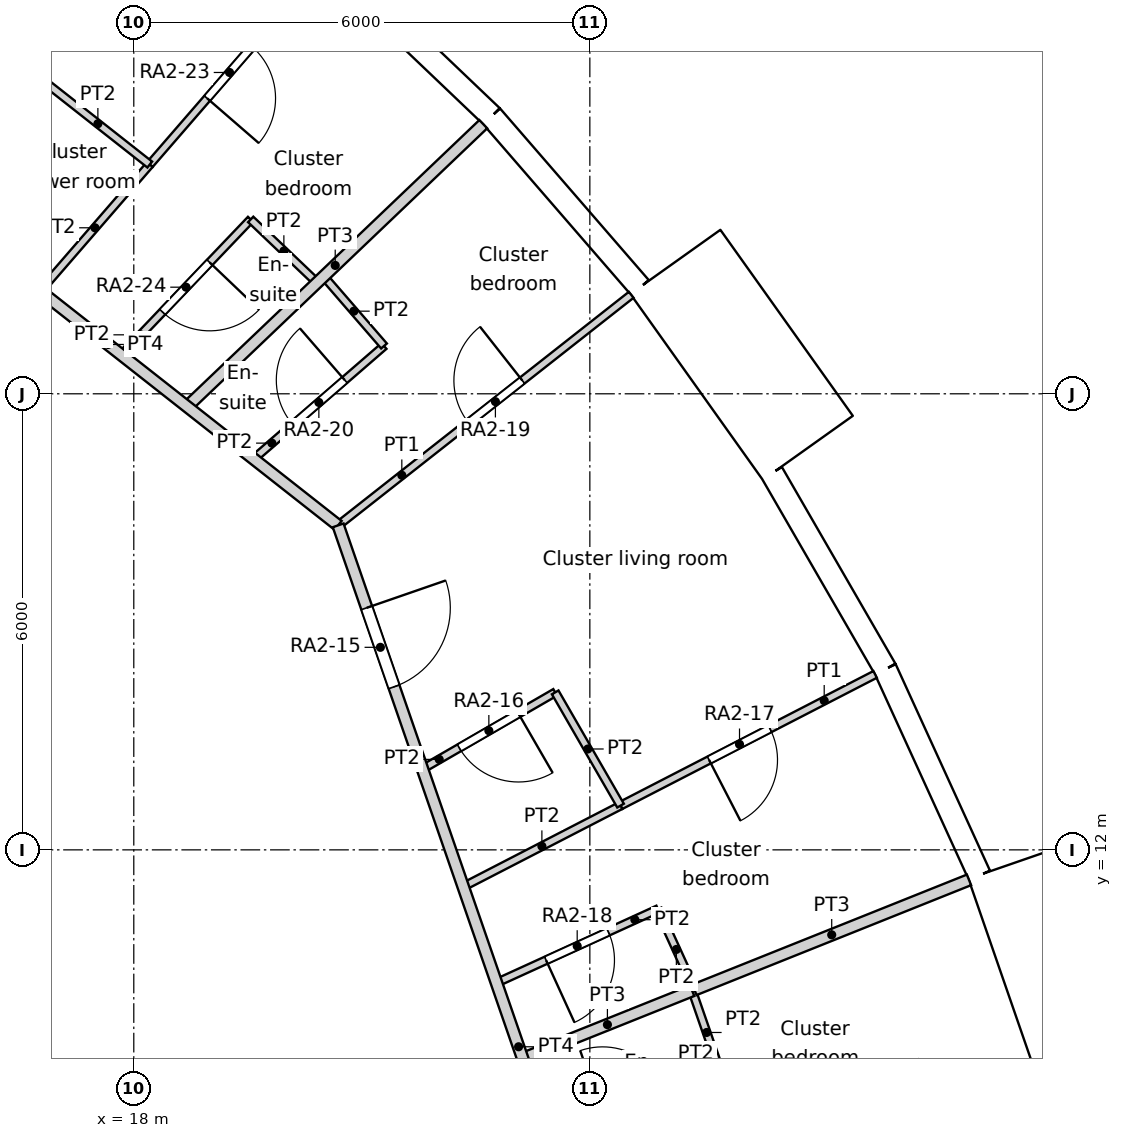
"""IFC4 building model, lengths in metres.
Left out: names, types, materials, properties, quantities, classifications, styles, units other than length and angle.
Written with IfcOpenShell. Run it as: python <this file> out.ifc"""

import sys

from ifc_helpers import new_model, si_unit, direction, frame, frame_2d, origin, origin_2d, place, context, subcontext, project, spatial, rectangle, circle, extrude, element, fill, save


model = new_model("IFC4")
c1 = context("Model", 3, precision=1e-05, world=origin(), true_north=direction((0.0, 1.0)))
c2 = subcontext(c1, "Body", "Model", "MODEL_VIEW")
j1 = project(units=[si_unit("LENGTHUNIT", "METRE"), si_unit("PLANEANGLEUNIT", "RADIAN")], contexts=[c1])
p1 = place(None, origin())
s1 = spatial("IfcSite", under=j1, at=p1, CompositionType="ELEMENT")
p2 = place(p1, origin())
s2 = spatial("IfcBuilding", under=s1, at=p2, CompositionType="ELEMENT")
p3 = place(p2, frame((0.0, 0.0, 39.0)))
s3 = spatial("IfcBuildingStorey", under=s2, at=p3, CompositionType="ELEMENT", Elevation=39.0)
for number, where, z_axis, x_axis in (
    (1, (28.106, 11.252, 0.0), (0.0, 0.0, 1.0), (1.0, 0.0, 0.0)),
    (2, (25.469, 16.368, 0.0), (0.0, 0.0, 1.0), (1.0, 0.0, 0.0)),
    (3, (21.911, 20.892, 0.0), (0.0, 0.0, 1.0), (1.0, 0.0, 0.0)),
):
    element("IfcColumn", number, at=place(p3, frame(where, z_axis=z_axis, x_axis=x_axis)), inside=s3, PredefinedType="COLUMN", context=c2, shape_type="SweptSolid", body=[
        extrude(circle(Radius=0.7, at=origin_2d()), origin(), (0.0, 0.0, 1.0), 3.6),
    ])
for number, where, z_axis, x_axis in (
    (4, (21.937, 11.017, 0.0), (0.0, 0.0, 1.0), (1.0, 0.0, 0.0)),
    (5, (18.805, 15.779, 0.0), (0.0, 0.0, 1.0), (1.0, 0.0, 0.0)),
):
    element("IfcColumn", number, at=place(p3, frame(where, z_axis=z_axis, x_axis=x_axis)), inside=s3, PredefinedType="COLUMN", context=c2, shape_type="SweptSolid", body=[
        extrude(circle(Radius=0.75, at=origin_2d()), origin(), (0.0, 0.0, 1.0), 3.6),
    ])
p4 = place(p3, frame((30.649, 9.021, -0.45), z_axis=(0.0, 0.0, 1.0), x_axis=(-0.327071431777, 0.944999618262, 0.0)))
e6 = element("IfcWall", 6, at=p4, inside=s3, PredefinedType="ELEMENTEDWALL", context=c2, shape_type="SweptSolid", body=[
    extrude(rectangle(XDim=3.0, YDim=1.45, at=frame_2d((1.5, 0.0))), origin(), (0.0, 0.0, 1.0), 3.6),
])
p5 = place(p4, frame((1.5, 0.0, 2.0)))
e7 = element("IfcOpeningElement", 7, at=p5, cuts=e6, PredefinedType="OPENING", context=c2, shape_type="SweptSolid", body=[
    extrude(circle(Radius=0.9, at=origin_2d()), frame((0.0, 0.735, 0.0), z_axis=(0.0, -1.0, 0.0), x_axis=(1.0, 0.0, 0.0)), (0.0, 0.0, 1.0), 1.47),
])
p6 = place(p3, frame((29.125, 11.666, 0.0), z_axis=(0.0, 0.0, 1.0), x_axis=(-0.415407317162, 0.909635509888, 0.0)))
e8 = element("IfcWall", 8, at=p6, inside=s3, PredefinedType="SOLIDWALL", context=c2, shape_type="SweptSolid", body=[
    extrude(rectangle(XDim=2.98, YDim=0.3, at=frame_2d((1.49, 0.0))), origin(), (0.0, 0.0, 1.0), 3.15),
])
p7 = place(p6, frame((1.49, 0.0, 1.55)))
e9 = element("IfcOpeningElement", 9, at=p7, cuts=e8, PredefinedType="OPENING", context=c2, shape_type="SweptSolid", body=[
    extrude(circle(Radius=0.9, at=origin_2d()), frame((0.0, 0.16, 0.0), z_axis=(0.0, -1.0, 0.0), x_axis=(1.0, 0.0, 0.0)), (0.0, 0.0, 1.0), 0.32),
])
p8 = place(p3, frame((27.887, 14.377, 0.0), z_axis=(0.0, 0.0, 1.0), x_axis=(-0.499999078476, 0.866025935826, 0.0)))
e10 = element("IfcWall", 10, at=p8, inside=s3, PredefinedType="SOLIDWALL", context=c2, shape_type="SweptSolid", body=[
    extrude(rectangle(XDim=2.979, YDim=0.3, at=frame_2d((1.49, 0.0))), origin(), (0.0, 0.0, 1.0), 3.15),
])
p9 = place(p8, frame((1.49, 0.0, 1.55)))
e11 = element("IfcOpeningElement", 11, at=p9, cuts=e10, PredefinedType="OPENING", context=c2, shape_type="SweptSolid", body=[
    extrude(circle(Radius=0.9, at=origin_2d()), frame((0.0, 0.16, 0.0), z_axis=(0.0, -1.0, 0.0), x_axis=(1.0, 0.0, 0.0)), (0.0, 0.0, 1.0), 0.32),
])
p10 = place(p3, frame((26.866, 17.29, -0.45), z_axis=(0.0, 0.0, 1.0), x_axis=(-0.580090570606, 0.814551981088, 0.0)))
e12 = element("IfcWall", 12, at=p10, inside=s3, PredefinedType="ELEMENTEDWALL", context=c2, shape_type="SweptSolid", body=[
    extrude(rectangle(XDim=3.0, YDim=1.45, at=frame_2d((1.5, 0.0))), origin(), (0.0, 0.0, 1.0), 3.6),
])
p11 = place(p10, frame((1.5, 0.0, 2.0)))
e13 = element("IfcOpeningElement", 13, at=p11, cuts=e12, PredefinedType="OPENING", context=c2, shape_type="SweptSolid", body=[
    extrude(circle(Radius=0.9, at=origin_2d()), frame((0.0, 0.735, 0.0), z_axis=(0.0, -1.0, 0.0), x_axis=(1.0, 0.0, 0.0)), (0.0, 0.0, 1.0), 1.47),
])
p12 = place(p3, frame((24.658, 19.399, 0.0), z_axis=(0.0, 0.0, 1.0), x_axis=(-0.654830712471, 0.755775587066, 0.0)))
e14 = element("IfcWall", 14, at=p12, inside=s3, PredefinedType="SOLIDWALL", context=c2, shape_type="SweptSolid", body=[
    extrude(rectangle(XDim=2.98, YDim=0.3, at=frame_2d((1.49, 0.0))), origin(), (0.0, 0.0, 1.0), 3.15),
])
p13 = place(p12, frame((1.49, 0.0, 1.55)))
e15 = element("IfcOpeningElement", 15, at=p13, cuts=e14, PredefinedType="OPENING", context=c2, shape_type="SweptSolid", body=[
    extrude(circle(Radius=0.9, at=origin_2d()), frame((0.0, 0.16, 0.0), z_axis=(0.0, -1.0, 0.0), x_axis=(1.0, 0.0, 0.0)), (0.0, 0.0, 1.0), 0.32),
])
p14 = place(p3, frame((22.707, 21.651, 0.0), z_axis=(0.0, 0.0, 1.0), x_axis=(-0.723744206617, 0.690068346896, 0.0)))
e16 = element("IfcWall", 16, at=p14, inside=s3, PredefinedType="SOLIDWALL", context=c2, shape_type="SweptSolid", body=[
    extrude(rectangle(XDim=2.98, YDim=0.3, at=frame_2d((1.49, 0.0))), origin(), (0.0, 0.0, 1.0), 3.15),
])
p15 = place(p14, frame((1.49, 0.0, 1.55)))
e17 = element("IfcOpeningElement", 17, at=p15, cuts=e16, PredefinedType="OPENING", context=c2, shape_type="SweptSolid", body=[
    extrude(circle(Radius=0.9, at=origin_2d()), frame((0.0, 0.16, 0.0), z_axis=(0.0, -1.0, 0.0), x_axis=(1.0, 0.0, 0.0)), (0.0, 0.0, 1.0), 0.32),
])
p16 = place(p3, frame((20.689, 16.269, 0.0), z_axis=(0.0, 0.0, 1.0), x_axis=(0.327000485361, -0.945024170365, 0.0)))
e18 = element("IfcWall", 18, at=p16, inside=s3, PredefinedType="PARTITIONING", context=c2, shape_type="SweptSolid", body=[
    extrude(rectangle(XDim=17.216, YDim=0.15, at=frame_2d((8.608, 0.0))), origin(), (0.0, 0.0, 1.0), 3.15),
])
p17 = place(p16, frame((12.47, 0.0, 0.0)))
e19 = element("IfcOpeningElement", 19, at=p17, cuts=e18, PredefinedType="OPENING", context=c2, shape_type="SweptSolid", body=[
    extrude(rectangle(XDim=1.1, YDim=2.1, at=frame_2d((0.55, 1.05))), frame((0.0, 0.075, 0.0), z_axis=(0.0, -1.0, 0.0), x_axis=(1.0, 0.0, 0.0)), (0.0, 0.0, 1.0), 0.15),
])
p18 = place(p16, frame((1.148, 0.0, 0.0)))
e20 = element("IfcOpeningElement", 20, at=p18, cuts=e18, PredefinedType="OPENING", context=c2, shape_type="SweptSolid", body=[
    extrude(rectangle(XDim=1.1, YDim=2.1, at=frame_2d((0.55, 1.05))), frame((0.0, 0.075, 0.0), z_axis=(0.0, -1.0, 0.0), x_axis=(1.0, 0.0, 0.0)), (0.0, 0.0, 1.0), 0.15),
])
p19 = place(p3, frame((10.933, 23.94, 0.0), z_axis=(0.0, 0.0, 1.0), x_axis=(0.786069782367, -0.618137765591, 0.0)))
e21 = element("IfcWall", 21, at=p19, inside=s3, PredefinedType="PARTITIONING", context=c2, shape_type="SweptSolid", body=[
    extrude(rectangle(XDim=12.41, YDim=0.15, at=frame_2d((6.205, 0.0))), origin(), (0.0, 0.0, 1.0), 3.15),
])
p20 = place(p19, frame((3.559, 0.0, 0.0)))
e22 = element("IfcOpeningElement", 22, at=p20, cuts=e21, PredefinedType="OPENING", context=c2, shape_type="SweptSolid", body=[
    extrude(rectangle(XDim=1.1, YDim=2.1, at=frame_2d((0.55, 1.05))), frame((0.0, 0.075, 0.0), z_axis=(0.0, -1.0, 0.0), x_axis=(1.0, 0.0, 0.0)), (0.0, 0.0, 1.0), 0.15),
])
p21 = place(p3, frame((25.346, 10.147, 0.0), z_axis=(0.0, 0.0, 1.0), x_axis=(0.327665639351, -0.944793749338, 0.0)))
e23 = element("IfcWall", 23, at=p21, inside=s3, PredefinedType="PARTITIONING", context=c2, shape_type="SweptSolid", body=[
    extrude(rectangle(XDim=1.163, YDim=0.1, at=frame_2d((0.582, 0.0))), origin(), (0.0, 0.0, 1.0), 3.15),
])
p22 = place(p3, frame((25.376, 10.159, 0.0), z_axis=(0.0, 0.0, 1.0), x_axis=(0.928368463908, 0.371661129553, 0.0)))
e24 = element("IfcWall", 24, at=p22, inside=s3, PredefinedType="PARTITIONING", context=c2, shape_type="SweptSolid", body=[
    extrude(rectangle(XDim=3.891, YDim=0.15, at=frame_2d((1.945, 0.0))), origin(), (0.0, 0.0, 1.0), 3.15),
])
p23 = place(p3, frame((23.116, 9.254, 0.0), z_axis=(0.0, 0.0, 1.0), x_axis=(0.928322407966, 0.371776151559, 0.0)))
e25 = element("IfcWall", 25, at=p23, inside=s3, PredefinedType="PARTITIONING", context=c2, shape_type="SweptSolid", body=[
    extrude(rectangle(XDim=2.402, YDim=0.15, at=frame_2d((1.201, 0.0))), origin(), (0.0, 0.0, 1.0), 3.15),
])
p24 = place(p3, frame((23.544, 14.072, 0.0), z_axis=(0.0, 0.0, 1.0), x_axis=(0.499939472521, -0.866060346521, 0.0)))
e26 = element("IfcWall", 26, at=p24, inside=s3, PredefinedType="PARTITIONING", context=c2, shape_type="SweptSolid", body=[
    extrude(rectangle(XDim=1.72, YDim=0.1, at=frame_2d((0.86, 0.0))), origin(), (0.0, 0.0, 1.0), 3.15),
])
p25 = place(p3, frame((21.798, 13.063, 0.0), z_axis=(0.0, 0.0, 1.0), x_axis=(0.865796302872, 0.500396604638, 0.0)))
e27 = element("IfcWall", 27, at=p25, inside=s3, PredefinedType="PARTITIONING", context=c2, shape_type="SweptSolid", body=[
    extrude(rectangle(XDim=2.016, YDim=0.1, at=frame_2d((1.008, 0.0))), origin(), (0.0, 0.0, 1.0), 3.15),
])
p26 = place(p25, frame((0.559, 0.0, 0.0)))
e28 = element("IfcOpeningElement", 28, at=p26, cuts=e27, PredefinedType="OPENING", context=c2, shape_type="SweptSolid", body=[
    extrude(rectangle(XDim=0.9, YDim=2.0, at=frame_2d((0.45, 1.0))), frame((0.0, 0.05, 0.0), z_axis=(0.0, -1.0, 0.0), x_axis=(1.0, 0.0, 0.0)), (0.0, 0.0, 1.0), 0.1),
])
p27 = place(p3, frame((24.404, 12.582, 0.0), z_axis=(0.0, 0.0, 1.0), x_axis=(0.888877805079, 0.458144352403, 0.0)))
e29 = element("IfcWall", 29, at=p27, inside=s3, PredefinedType="PARTITIONING", context=c2, shape_type="SweptSolid", body=[
    extrude(rectangle(XDim=3.768, YDim=0.1, at=frame_2d((1.884, 0.0))), origin(), (0.0, 0.0, 1.0), 3.15),
])
p28 = place(p27, frame((1.311, 0.0, 0.0)))
e30 = element("IfcOpeningElement", 30, at=p28, cuts=e29, PredefinedType="OPENING", context=c2, shape_type="SweptSolid", body=[
    extrude(rectangle(XDim=0.9, YDim=2.1, at=frame_2d((0.45, 1.05))), frame((0.0, 0.05, 0.0), z_axis=(0.0, -1.0, 0.0), x_axis=(1.0, 0.0, 0.0)), (0.0, 0.0, 1.0), 0.1),
])
p29 = place(p3, frame((20.688, 16.269, 0.0), z_axis=(0.0, 0.0, 1.0), x_axis=(0.78599357822, 0.618234660139, 0.0)))
e31 = element("IfcWall", 31, at=p29, inside=s3, PredefinedType="PARTITIONING", context=c2, shape_type="SweptSolid", body=[
    extrude(rectangle(XDim=4.906, YDim=0.1, at=frame_2d((2.453, 0.0))), origin(), (0.0, 0.0, 1.0), 3.15),
])
p30 = place(p29, frame((2.183, 0.0, 0.0)))
e32 = element("IfcOpeningElement", 32, at=p30, cuts=e31, PredefinedType="OPENING", context=c2, shape_type="SweptSolid", body=[
    extrude(rectangle(XDim=0.9, YDim=2.1, at=frame_2d((0.45, 1.05))), frame((0.0, 0.05, 0.0), z_axis=(0.0, -1.0, 0.0), x_axis=(1.0, 0.0, 0.0)), (0.0, 0.0, 1.0), 0.1),
])
p31 = place(p3, frame((22.334, 11.514, 0.0), z_axis=(0.0, 0.0, 1.0), x_axis=(0.888674390259, 0.45853879672, 0.0)))
e33 = element("IfcWall", 33, at=p31, inside=s3, PredefinedType="PARTITIONING", context=c2, shape_type="SweptSolid", body=[
    extrude(rectangle(XDim=2.329, YDim=0.1, at=frame_2d((1.165, 0.0))), origin(), (0.0, 0.0, 1.0), 3.15),
])
p32 = place(p3, frame((24.896, 11.22, 0.0), z_axis=(0.0, 0.0, 1.0), x_axis=(0.415254658207, -0.909705209855, 0.0)))
e34 = element("IfcWall", 34, at=p32, inside=s3, PredefinedType="PARTITIONING", context=c2, shape_type="SweptSolid", body=[
    extrude(rectangle(XDim=1.165, YDim=0.1, at=frame_2d((0.583, 0.0))), origin(), (0.0, 0.0, 1.0), 3.15),
])
p33 = place(p3, frame((22.771, 10.25, 0.0), z_axis=(0.0, 0.0, 1.0), x_axis=(0.909710320081, 0.415243462969, 0.0)))
e35 = element("IfcWall", 35, at=p33, inside=s3, PredefinedType="PARTITIONING", context=c2, shape_type="SweptSolid", body=[
    extrude(rectangle(XDim=2.336, YDim=0.1, at=frame_2d((1.168, 0.0))), origin(), (0.0, 0.0, 1.0), 3.15),
])
p34 = place(p33, frame((0.718, 0.0, 0.0)))
e36 = element("IfcOpeningElement", 36, at=p34, cuts=e35, PredefinedType="OPENING", context=c2, shape_type="SweptSolid", body=[
    extrude(rectangle(XDim=0.9, YDim=2.04, at=frame_2d((0.45, 1.02))), frame((0.0, 0.05, 0.0), z_axis=(0.0, -1.0, 0.0), x_axis=(1.0, 0.0, 0.0)), (0.0, 0.0, 1.0), 0.1),
])
p35 = place(p3, frame((19.577, 17.143, 0.0), z_axis=(0.0, 0.0, 1.0), x_axis=(0.755813315469, 0.654787165543, 0.0)))
e37 = element("IfcWall", 37, at=p35, inside=s3, PredefinedType="PARTITIONING", context=c2, shape_type="SweptSolid", body=[
    extrude(rectangle(XDim=2.269, YDim=0.1, at=frame_2d((1.135, 0.0))), origin(), (0.0, 0.0, 1.0), 3.15),
])
p36 = place(p35, frame((0.685, 0.0, 0.0)))
e38 = element("IfcOpeningElement", 38, at=p36, cuts=e37, PredefinedType="OPENING", context=c2, shape_type="SweptSolid", body=[
    extrude(rectangle(XDim=0.9, YDim=2.04, at=frame_2d((0.45, 1.02))), frame((0.0, 0.05, 0.0), z_axis=(0.0, -1.0, 0.0), x_axis=(1.0, 0.0, 0.0)), (0.0, 0.0, 1.0), 0.1),
])
p37 = place(p3, frame((20.499, 19.545, 0.0), z_axis=(0.0, 0.0, 1.0), x_axis=(0.654500819756, -0.756061291787, 0.0)))
e39 = element("IfcWall", 39, at=p37, inside=s3, PredefinedType="PARTITIONING", context=c2, shape_type="SweptSolid", body=[
    extrude(rectangle(XDim=1.212, YDim=0.1, at=frame_2d((0.606, 0.0))), origin(), (0.0, 0.0, 1.0), 3.15),
])
p38 = place(p3, frame((18.702, 17.831, 0.0), z_axis=(0.0, 0.0, 1.0), x_axis=(0.723619032975, 0.690199605271, 0.0)))
e40 = element("IfcWall", 40, at=p38, inside=s3, PredefinedType="PARTITIONING", context=c2, shape_type="SweptSolid", body=[
    extrude(rectangle(XDim=5.384, YDim=0.15, at=frame_2d((2.692, 0.0))), origin(), (0.0, 0.0, 1.0), 3.15),
])
p39 = place(p3, frame((16.845, 22.09, 0.0), z_axis=(0.0, 0.0, 1.0), x_axis=(0.785903559082, -0.618349088964, 0.0)))
e41 = element("IfcWall", 41, at=p39, inside=s3, PredefinedType="PARTITIONING", context=c2, shape_type="SweptSolid", body=[
    extrude(rectangle(XDim=1.737, YDim=0.1, at=frame_2d((0.868, 0.0))), origin(), (0.0, 0.0, 1.0), 3.15),
])
p40 = place(p3, frame((18.21, 21.016, 0.0), z_axis=(0.0, 0.0, 1.0), x_axis=(0.655012143666, 0.755618350525, 0.0)))
e42 = element("IfcWall", 42, at=p40, inside=s3, PredefinedType="PARTITIONING", context=c2, shape_type="SweptSolid", body=[
    extrude(rectangle(XDim=3.417, YDim=0.1, at=frame_2d((1.708, 0.0))), origin(), (0.0, 0.0, 1.0), 3.15),
])
p41 = place(p40, frame((1.153, 0.0, 0.0)))
e43 = element("IfcOpeningElement", 43, at=p41, cuts=e42, PredefinedType="OPENING", context=c2, shape_type="SweptSolid", body=[
    extrude(rectangle(XDim=0.9, YDim=2.1, at=frame_2d((0.45, 1.05))), frame((0.0, 0.05, 0.0), z_axis=(0.0, -1.0, 0.0), x_axis=(1.0, 0.0, 0.0)), (0.0, 0.0, 1.0), 0.1),
])
p42 = place(p3, frame((16.768, 19.352, 0.0), z_axis=(0.0, 0.0, 1.0), x_axis=(0.654854551667, 0.755754931284, 0.0)))
e44 = element("IfcWall", 44, at=p42, inside=s3, PredefinedType="PARTITIONING", context=c2, shape_type="SweptSolid", body=[
    extrude(rectangle(XDim=2.202, YDim=0.1, at=frame_2d((1.101, 0.0))), origin(), (0.0, 0.0, 1.0), 3.15),
])
p43 = place(p3, frame((19.538, 20.294, 0.0), z_axis=(0.0, 0.0, 1.0), x_axis=(0.723810439605, -0.689998875013, 0.0)))
e45 = element("IfcWall", 45, at=p43, inside=s3, PredefinedType="PARTITIONING", context=c2, shape_type="SweptSolid", body=[
    extrude(rectangle(XDim=1.206, YDim=0.1, at=frame_2d((0.603, 0.0))), origin(), (0.0, 0.0, 1.0), 3.15),
])
p44 = place(p3, frame((17.837, 18.511, 0.0), z_axis=(0.0, 0.0, 1.0), x_axis=(0.690317861289, 0.723506220005, 0.0)))
e46 = element("IfcWall", 46, at=p44, inside=s3, PredefinedType="PARTITIONING", context=c2, shape_type="SweptSolid", body=[
    extrude(rectangle(XDim=2.464, YDim=0.1, at=frame_2d((1.232, 0.0))), origin(), (0.0, 0.0, 1.0), 3.15),
])
p45 = place(p44, frame((0.782, 0.0, 0.0)))
e47 = element("IfcOpeningElement", 47, at=p45, cuts=e46, PredefinedType="OPENING", context=c2, shape_type="SweptSolid", body=[
    extrude(rectangle(XDim=0.9, YDim=2.04, at=frame_2d((0.45, 1.02))), frame((0.0, 0.05, 0.0), z_axis=(0.0, -1.0, 0.0), x_axis=(1.0, 0.0, 0.0)), (0.0, 0.0, 1.0), 0.1),
])
p46 = place(p5, origin())
e48 = element("IfcWindow", 48, at=p46, inside=s3, PartitioningType="SINGLE_PANEL", PredefinedType="WINDOW", context=c2, shape_type="SweptSolid", body=[
    extrude(circle(Radius=0.9, at=origin_2d()), frame((0.0, 0.695, 0.0), z_axis=(0.0, -1.0, 0.0), x_axis=(1.0, 0.0, 0.0)), (0.0, 0.0, 1.0), 0.1),
])
fill(e7, e48)
p47 = place(p7, origin())
e49 = element("IfcWindow", 49, at=p47, inside=s3, PartitioningType="SINGLE_PANEL", PredefinedType="WINDOW", context=c2, shape_type="SweptSolid", body=[
    extrude(circle(Radius=0.9, at=origin_2d()), frame((0.0, 0.12, 0.0), z_axis=(0.0, -1.0, 0.0), x_axis=(1.0, 0.0, 0.0)), (0.0, 0.0, 1.0), 0.1),
])
fill(e9, e49)
p48 = place(p9, origin())
e50 = element("IfcWindow", 50, at=p48, inside=s3, PartitioningType="SINGLE_PANEL", PredefinedType="WINDOW", context=c2, shape_type="SweptSolid", body=[
    extrude(circle(Radius=0.9, at=origin_2d()), frame((0.0, 0.12, 0.0), z_axis=(0.0, -1.0, 0.0), x_axis=(1.0, 0.0, 0.0)), (0.0, 0.0, 1.0), 0.1),
])
fill(e11, e50)
p49 = place(p11, origin())
e51 = element("IfcWindow", 51, at=p49, inside=s3, PartitioningType="SINGLE_PANEL", PredefinedType="WINDOW", context=c2, shape_type="SweptSolid", body=[
    extrude(circle(Radius=0.9, at=origin_2d()), frame((0.0, 0.695, 0.0), z_axis=(0.0, -1.0, 0.0), x_axis=(1.0, 0.0, 0.0)), (0.0, 0.0, 1.0), 0.1),
])
fill(e13, e51)
p50 = place(p13, origin())
e52 = element("IfcWindow", 52, at=p50, inside=s3, PartitioningType="SINGLE_PANEL", PredefinedType="WINDOW", context=c2, shape_type="SweptSolid", body=[
    extrude(circle(Radius=0.9, at=origin_2d()), frame((0.0, 0.12, 0.0), z_axis=(0.0, -1.0, 0.0), x_axis=(1.0, 0.0, 0.0)), (0.0, 0.0, 1.0), 0.1),
])
fill(e15, e52)
p51 = place(p15, origin())
e53 = element("IfcWindow", 53, at=p51, inside=s3, PartitioningType="SINGLE_PANEL", PredefinedType="WINDOW", context=c2, shape_type="SweptSolid", body=[
    extrude(circle(Radius=0.9, at=origin_2d()), frame((0.0, 0.12, 0.0), z_axis=(0.0, -1.0, 0.0), x_axis=(1.0, 0.0, 0.0)), (0.0, 0.0, 1.0), 0.1),
])
fill(e17, e53)
p52 = place(p18, origin())
e54 = element("IfcDoor", 54, at=p52, inside=s3, OperationType="SINGLE_SWING_LEFT", PredefinedType="DOOR", context=c2, shape_type="SweptSolid", body=[
    extrude(rectangle(XDim=1.1, YDim=2.1, at=frame_2d((0.55, 1.05))), frame((0.0, 0.025, 0.0), z_axis=(0.0, -1.0, 0.0), x_axis=(1.0, 0.0, 0.0)), (0.0, 0.0, 1.0), 0.05),
])
fill(e20, e54)
p53 = place(p26, origin())
e55 = element("IfcDoor", 55, at=p53, inside=s3, OperationType="SINGLE_SWING_LEFT", PredefinedType="DOOR", context=c2, shape_type="SweptSolid", body=[
    extrude(rectangle(XDim=0.9, YDim=2.0, at=frame_2d((0.45, 1.0))), frame((0.0, 0.025, 0.0), z_axis=(0.0, -1.0, 0.0), x_axis=(1.0, 0.0, 0.0)), (0.0, 0.0, 1.0), 0.05),
])
fill(e28, e55)
p54 = place(p28, origin())
e56 = element("IfcDoor", 56, at=p54, inside=s3, OperationType="SINGLE_SWING_RIGHT", PredefinedType="DOOR", context=c2, shape_type="SweptSolid", body=[
    extrude(rectangle(XDim=0.9, YDim=2.1, at=frame_2d((0.45, 1.05))), frame((0.0, 0.025, 0.0), z_axis=(0.0, -1.0, 0.0), x_axis=(1.0, 0.0, 0.0)), (0.0, 0.0, 1.0), 0.05),
])
fill(e30, e56)
p55 = place(p34, origin())
e57 = element("IfcDoor", 57, at=p55, inside=s3, OperationType="SINGLE_SWING_RIGHT", PredefinedType="DOOR", context=c2, shape_type="SweptSolid", body=[
    extrude(rectangle(XDim=0.9, YDim=2.04, at=frame_2d((0.45, 1.02))), frame((0.0, 0.025, 0.0), z_axis=(0.0, -1.0, 0.0), x_axis=(1.0, 0.0, 0.0)), (0.0, 0.0, 1.0), 0.05),
])
fill(e36, e57)
p56 = place(p30, origin())
e58 = element("IfcDoor", 58, at=p56, inside=s3, OperationType="SINGLE_SWING_RIGHT", PredefinedType="DOOR", context=c2, shape_type="SweptSolid", body=[
    extrude(rectangle(XDim=0.9, YDim=2.1, at=frame_2d((0.45, 1.05))), frame((0.0, 0.025, 0.0), z_axis=(0.0, -1.0, 0.0), x_axis=(1.0, 0.0, 0.0)), (0.0, 0.0, 1.0), 0.05),
])
fill(e32, e58)
p57 = place(p36, origin())
e59 = element("IfcDoor", 59, at=p57, inside=s3, OperationType="SINGLE_SWING_RIGHT", PredefinedType="DOOR", context=c2, shape_type="SweptSolid", body=[
    extrude(rectangle(XDim=0.9, YDim=2.04, at=frame_2d((0.45, 1.02))), frame((0.0, 0.025, 0.0), z_axis=(0.0, -1.0, 0.0), x_axis=(1.0, 0.0, 0.0)), (0.0, 0.0, 1.0), 0.05),
])
fill(e38, e59)
p58 = place(p41, origin())
e60 = element("IfcDoor", 60, at=p58, inside=s3, OperationType="SINGLE_SWING_RIGHT", PredefinedType="DOOR", context=c2, shape_type="SweptSolid", body=[
    extrude(rectangle(XDim=0.9, YDim=2.1, at=frame_2d((0.45, 1.05))), frame((0.0, 0.025, 0.0), z_axis=(0.0, -1.0, 0.0), x_axis=(1.0, 0.0, 0.0)), (0.0, 0.0, 1.0), 0.05),
])
fill(e43, e60)
p59 = place(p45, origin())
e61 = element("IfcDoor", 61, at=p59, inside=s3, OperationType="SINGLE_SWING_LEFT", PredefinedType="DOOR", context=c2, shape_type="SweptSolid", body=[
    extrude(rectangle(XDim=0.9, YDim=2.04, at=frame_2d((0.45, 1.02))), frame((0.0, 0.025, 0.0), z_axis=(0.0, -1.0, 0.0), x_axis=(1.0, 0.0, 0.0)), (0.0, 0.0, 1.0), 0.05),
])
fill(e47, e61)
save(model, sys.argv[1])
